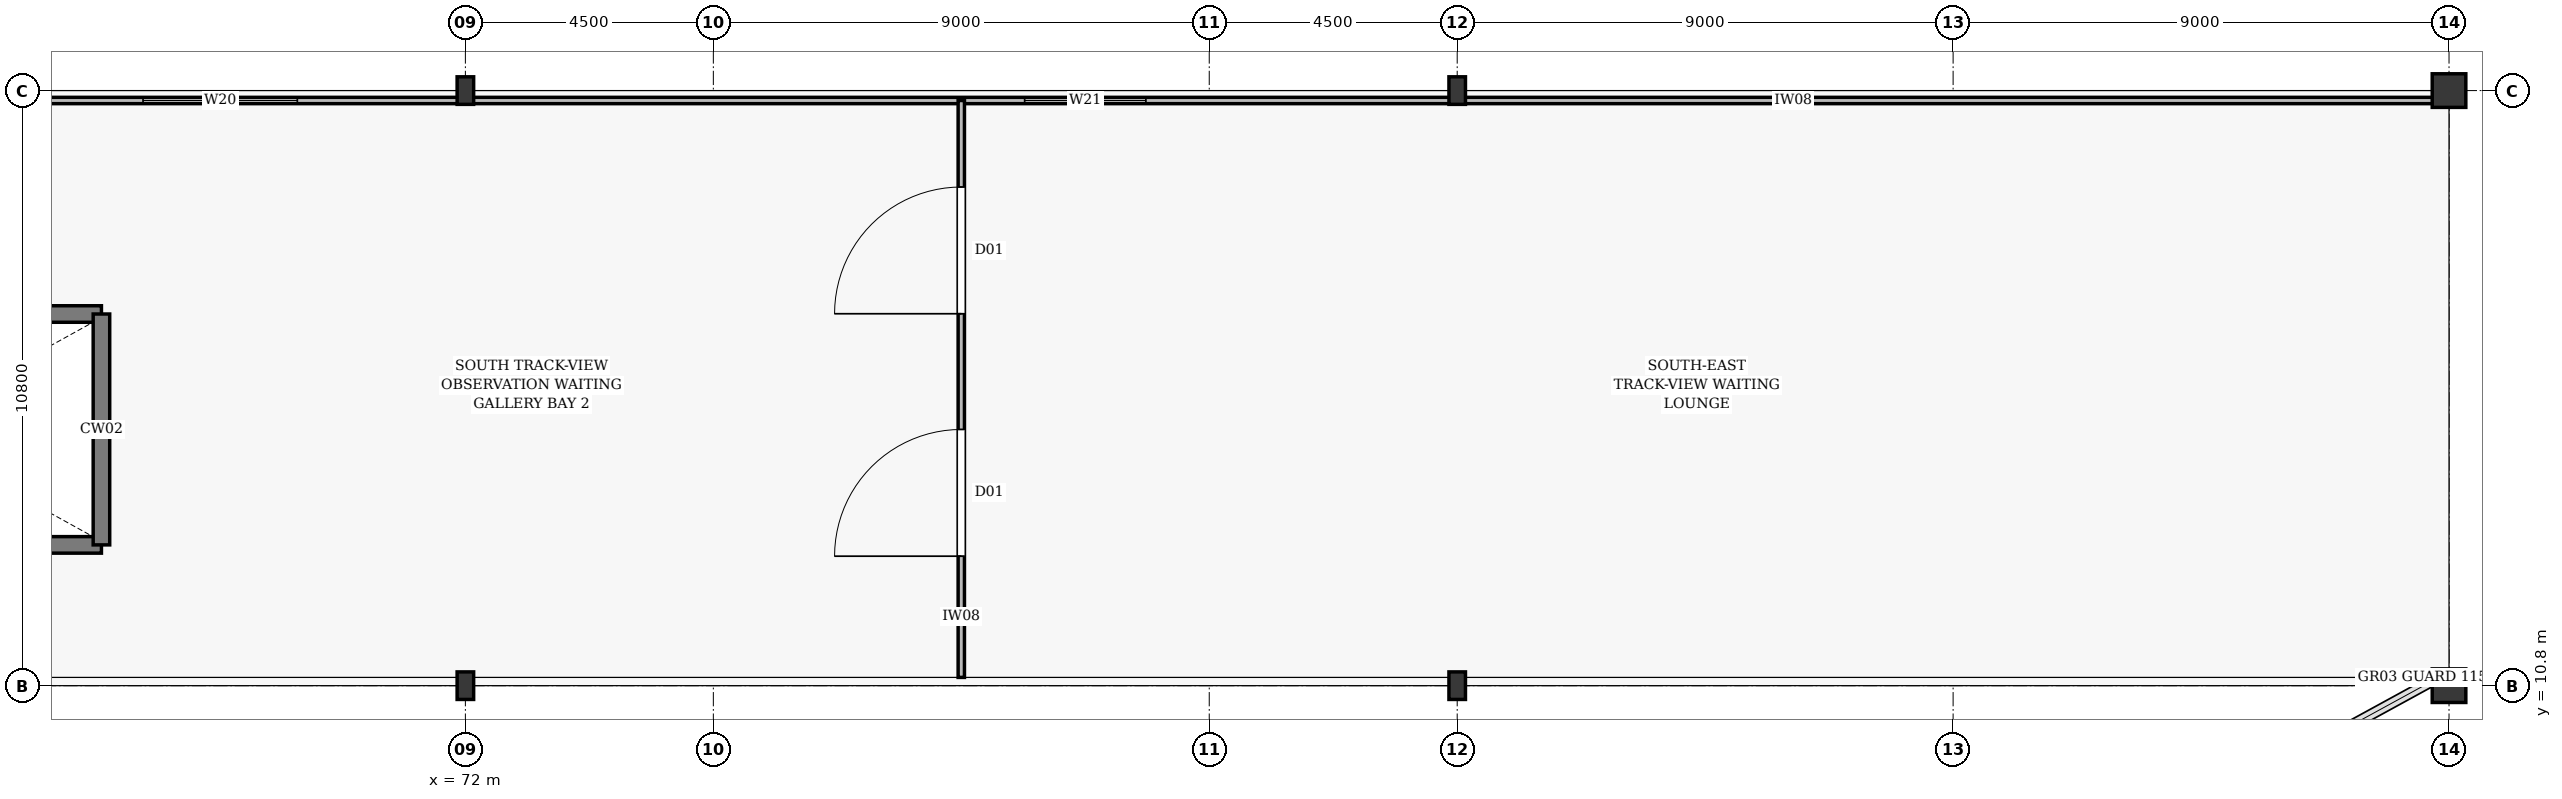
"""IFC4 building model, lengths in metres.
Left out: names, types, materials, properties, quantities, classifications, styles, units other than length and angle.
Written with IfcOpenShell. Run it as: python <this file> out.ifc"""

import sys

from ifc_helpers import new_model, si_unit, direction, frame, frame_2d, origin, origin_2d, place, context, subcontext, project, spatial, rectangle, hollow_circle, i_section, extrude, element, fill, save


model = new_model("IFC4")
c1 = context("Model", 3, precision=1e-05, world=origin(), true_north=direction((0.0, 1.0)))
c2 = subcontext(c1, "Body", "Model", "MODEL_VIEW")
j1 = project(units=[si_unit("LENGTHUNIT", "METRE"), si_unit("PLANEANGLEUNIT", "RADIAN")], contexts=[c1])
p1 = place(None, origin())
s1 = spatial("IfcSite", under=j1, at=p1, CompositionType="ELEMENT")
p2 = place(p1, origin())
s2 = spatial("IfcBuilding", under=s1, at=p2, CompositionType="ELEMENT")
p3 = place(p2, frame((0.0, 0.0, 12.6)))
s3 = spatial("IfcBuildingStorey", under=s2, at=p3, CompositionType="ELEMENT", Elevation=12.6)
for number, where, z_axis, x_axis in (
    (1, (72.0, 10.8, 0.0), (0.0, 0.0, 1.0), (1.0, 0.0, 0.0)),
    (2, (72.0, 21.6, 0.0), (0.0, 0.0, 1.0), (1.0, 0.0, 0.0)),
    (3, (90.0, 10.8, 0.0), (0.0, 0.0, 1.0), (1.0, 0.0, 0.0)),
    (4, (90.0, 21.6, 0.0), (0.0, 0.0, 1.0), (1.0, 0.0, 0.0)),
):
    element("IfcColumn", number, at=place(p3, frame(where, z_axis=z_axis, x_axis=x_axis)), inside=s3, PredefinedType="COLUMN", context=c2, shape_type="SweptSolid", body=[
        extrude(i_section(OverallWidth=0.3, OverallDepth=0.5, WebThickness=0.014, FlangeThickness=0.028, at=origin_2d()), origin(), (0.0, 0.0, 1.0), 3.2),
    ])
for number, where, z_axis, x_axis in (
    (5, (108.0, 10.8, 0.0), (0.0, 0.0, 1.0), (1.0, 0.0, 0.0)),
    (6, (108.0, 21.6, 0.0), (0.0, 0.0, 1.0), (1.0, 0.0, 0.0)),
):
    element("IfcColumn", number, at=place(p3, frame(where, z_axis=z_axis, x_axis=x_axis)), inside=s3, PredefinedType="COLUMN", context=c2, shape_type="SweptSolid", body=[
        extrude(hollow_circle(Radius=0.305, WallThickness=0.02, at=origin_2d()), origin(), (0.0, 0.0, 1.0), 3.2),
    ])
p4 = place(p3, frame((55.355, 13.355, 0.0), z_axis=(0.0, 0.0, 1.0), x_axis=(1.0, 0.0, 0.0)))
e7 = element("IfcWall", 7, at=p4, inside=s3, PredefinedType="SOLIDWALL", context=c2, shape_type="SweptSolid", body=[
    extrude(rectangle(XDim=10.04, YDim=0.3, at=frame_2d((5.02, 0.0))), origin(), (0.0, 0.0, 1.0), 4.5),
])
p5 = place(p3, frame((55.355, 17.545, 0.0), z_axis=(0.0, 0.0, 1.0), x_axis=(1.0, 0.0, 0.0)))
e8 = element("IfcWall", 8, at=p5, inside=s3, PredefinedType="SOLIDWALL", context=c2, shape_type="SweptSolid", body=[
    extrude(rectangle(XDim=10.04, YDim=0.3, at=frame_2d((5.02, 0.0))), origin(), (0.0, 0.0, 1.0), 4.5),
])
p6 = place(p5, frame((0.35, 0.0, 0.005)))
e9 = element("IfcOpeningElement", 9, at=p6, cuts=e8, PredefinedType="OPENING", context=c2, shape_type="SweptSolid", body=[
    extrude(rectangle(XDim=1.75, YDim=2.2, at=frame_2d((0.875, 1.1))), frame((0.0, 0.162, 0.0), z_axis=(0.0, -1.0, 0.0), x_axis=(1.0, 0.0, 0.0)), (0.0, 0.0, 1.0), 0.324),
])
p7 = place(p3, frame((65.395, 13.355, 0.0), z_axis=(0.0, 0.0, 1.0), x_axis=(0.0, 1.0, 0.0)))
e10 = element("IfcWall", 10, at=p7, inside=s3, PredefinedType="SOLIDWALL", context=c2, shape_type="SweptSolid", body=[
    extrude(rectangle(XDim=4.19, YDim=0.3, at=frame_2d((2.095, 0.0))), origin(), (0.0, 0.0, 1.0), 4.5),
])
p8 = place(p3, frame((54.15, 21.42, 0.0), z_axis=(0.0, 0.0, 1.0), x_axis=(1.0, 0.0, 0.0)))
e11 = element("IfcWall", 11, at=p8, inside=s3, PredefinedType="PARTITIONING", context=c2, shape_type="SweptSolid", body=[
    extrude(rectangle(XDim=53.7, YDim=0.115, at=frame_2d((26.85, 0.0))), origin(), (0.0, 0.0, 1.0), 4.35),
])
p9 = place(p8, frame((12.0, 0.0, 1.05)))
e12 = element("IfcOpeningElement", 12, at=p9, cuts=e11, PredefinedType="OPENING", context=c2, shape_type="SweptSolid", body=[
    extrude(rectangle(XDim=2.8, YDim=1.8, at=frame_2d((1.4, 0.9))), frame((0.0, 0.069, 0.0), z_axis=(0.0, -1.0, 0.0), x_axis=(1.0, 0.0, 0.0)), (0.0, 0.0, 1.0), 0.139),
])
p10 = place(p8, frame((28.0, 0.0, 1.05)))
e13 = element("IfcOpeningElement", 13, at=p10, cuts=e11, PredefinedType="OPENING", context=c2, shape_type="SweptSolid", body=[
    extrude(rectangle(XDim=2.2, YDim=1.6, at=frame_2d((1.1, 0.8))), frame((0.0, 0.069, 0.0), z_axis=(0.0, -1.0, 0.0), x_axis=(1.0, 0.0, 0.0)), (0.0, 0.0, 1.0), 0.139),
])
p11 = place(p3, frame((81.0, 10.95, 0.0), z_axis=(0.0, 0.0, 1.0), x_axis=(0.0, 1.0, 0.0)))
e14 = element("IfcWall", 14, at=p11, inside=s3, PredefinedType="PARTITIONING", context=c2, shape_type="SweptSolid", body=[
    extrude(rectangle(XDim=10.47, YDim=0.115, at=frame_2d((5.235, 0.0))), origin(), (0.0, 0.0, 1.0), 4.35),
])
p12 = place(p11, frame((2.2, 0.0, 0.005)))
e15 = element("IfcOpeningElement", 15, at=p12, cuts=e14, PredefinedType="OPENING", context=c2, shape_type="SweptSolid", body=[
    extrude(rectangle(XDim=2.3, YDim=2.4, at=frame_2d((1.15, 1.2))), frame((0.0, 0.069, 0.0), z_axis=(0.0, -1.0, 0.0), x_axis=(1.0, 0.0, 0.0)), (0.0, 0.0, 1.0), 0.139),
])
p13 = place(p11, frame((6.6, 0.0, 0.005)))
e16 = element("IfcOpeningElement", 16, at=p13, cuts=e14, PredefinedType="OPENING", context=c2, shape_type="SweptSolid", body=[
    extrude(rectangle(XDim=2.3, YDim=2.4, at=frame_2d((1.15, 1.2))), frame((0.0, 0.069, 0.0), z_axis=(0.0, -1.0, 0.0), x_axis=(1.0, 0.0, 0.0)), (0.0, 0.0, 1.0), 0.139),
])
p14 = place(p9, origin())
e17 = element("IfcWindow", 17, at=p14, inside=s3, PartitioningType="DOUBLE_PANEL_VERTICAL", PredefinedType="WINDOW", context=c2, shape_type="SweptSolid", body=[
    extrude(rectangle(XDim=2.8, YDim=1.8, at=frame_2d((1.4, 0.9))), frame((0.0, 0.03, 0.0), z_axis=(0.0, -1.0, 0.0), x_axis=(1.0, 0.0, 0.0)), (0.0, 0.0, 1.0), 0.06),
])
fill(e12, e17)
p15 = place(p10, origin())
e18 = element("IfcWindow", 18, at=p15, inside=s3, PartitioningType="DOUBLE_PANEL_VERTICAL", PredefinedType="WINDOW", context=c2, shape_type="SweptSolid", body=[
    extrude(rectangle(XDim=2.2, YDim=1.6, at=frame_2d((1.1, 0.8))), frame((0.0, 0.03, 0.0), z_axis=(0.0, -1.0, 0.0), x_axis=(1.0, 0.0, 0.0)), (0.0, 0.0, 1.0), 0.06),
])
fill(e13, e18)
p16 = place(p12, origin())
e19 = element("IfcDoor", 19, at=p16, inside=s3, OperationType="DOUBLE_DOOR_SINGLE_SWING", PredefinedType="DOOR", context=c2, shape_type="SweptSolid", body=[
    extrude(rectangle(XDim=2.3, YDim=2.4, at=frame_2d((1.15, 1.2))), frame((0.0, 0.025, 0.0), z_axis=(0.0, -1.0, 0.0), x_axis=(1.0, 0.0, 0.0)), (0.0, 0.0, 1.0), 0.05),
])
fill(e15, e19)
p17 = place(p13, origin())
e20 = element("IfcDoor", 20, at=p17, inside=s3, OperationType="DOUBLE_DOOR_SINGLE_SWING", PredefinedType="DOOR", context=c2, shape_type="SweptSolid", body=[
    extrude(rectangle(XDim=2.3, YDim=2.4, at=frame_2d((1.15, 1.2))), frame((0.0, 0.025, 0.0), z_axis=(0.0, -1.0, 0.0), x_axis=(1.0, 0.0, 0.0)), (0.0, 0.0, 1.0), 0.05),
])
fill(e16, e20)
save(model, sys.argv[1])
